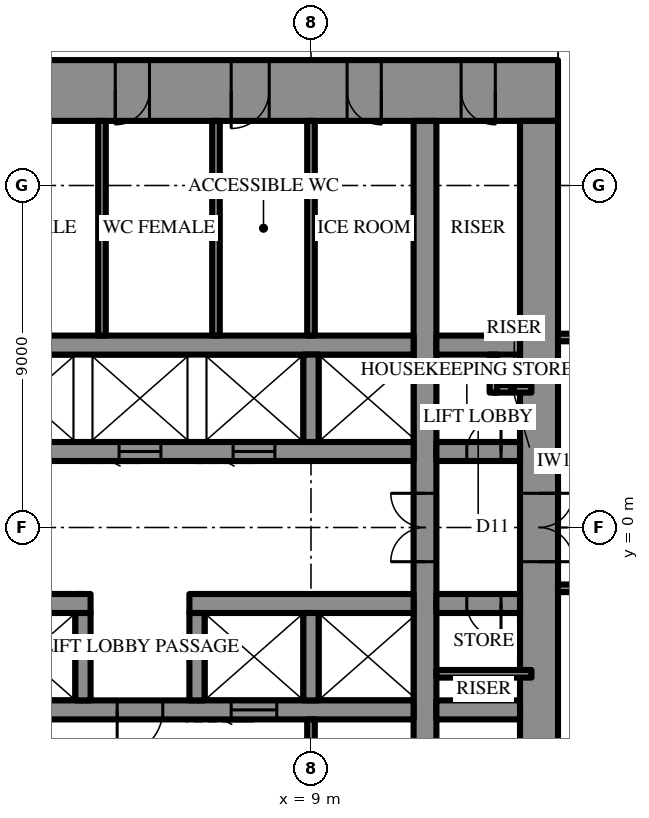
"""IFC4 building model, lengths in metres.
Left out: names, types, materials, properties, quantities, classifications, styles, units other than length and angle.
Written with IfcOpenShell. Run it as: python <this file> out.ifc"""

import sys

from ifc_helpers import new_model, si_unit, direction, frame, frame_2d, origin, place, context, subcontext, project, spatial, rectangle, extrude, element, fill, save


model = new_model("IFC4")
c1 = context("Model", 3, precision=1e-05, world=origin(), true_north=direction((0.0, 1.0)))
c2 = subcontext(c1, "Body", "Model", "MODEL_VIEW")
j1 = project(units=[si_unit("LENGTHUNIT", "METRE"), si_unit("PLANEANGLEUNIT", "RADIAN")], contexts=[c1])
p1 = place(None, origin())
s1 = spatial("IfcSite", under=j1, at=p1, CompositionType="ELEMENT")
p2 = place(p1, origin())
s2 = spatial("IfcBuilding", under=s1, at=p2, CompositionType="ELEMENT")
p3 = place(p2, frame((0.0, 0.0, 278.5)))
s3 = spatial("IfcBuildingStorey", under=s2, at=p3, CompositionType="ELEMENT", Elevation=278.5)
p4 = place(p3, frame((-15.5, 11.5, 0.0), z_axis=(0.0, 0.0, 1.0), x_axis=(1.0, 0.0, 0.0)))
e1 = element("IfcWall", 1, at=p4, inside=s3, PredefinedType="SHEAR", context=c2, shape_type="SweptSolid", body=[
    extrude(rectangle(XDim=31.0, YDim=1.6, at=frame_2d((15.5, 0.0))), origin(), (0.0, 0.0, 1.0), 4.2),
])
p5 = place(p4, frame((16.35, 0.0, 0.0)))
e2 = element("IfcOpeningElement", 2, at=p5, cuts=e1, PredefinedType="OPENING", context=c2, shape_type="SweptSolid", body=[
    extrude(rectangle(XDim=0.9, YDim=2.2, at=frame_2d((0.45, 1.1))), frame((0.0, 0.81, 0.0), z_axis=(0.0, -1.0, 0.0), x_axis=(1.0, 0.0, 0.0)), (0.0, 0.0, 1.0), 1.62),
])
p6 = place(p4, frame((19.35, 0.0, 0.0)))
e3 = element("IfcOpeningElement", 3, at=p6, cuts=e1, PredefinedType="OPENING", context=c2, shape_type="SweptSolid", body=[
    extrude(rectangle(XDim=0.9, YDim=2.2, at=frame_2d((0.45, 1.1))), frame((0.0, 0.81, 0.0), z_axis=(0.0, -1.0, 0.0), x_axis=(1.0, 0.0, 0.0)), (0.0, 0.0, 1.0), 1.62),
])
p7 = place(p4, frame((22.4, 0.0, 0.0)))
e4 = element("IfcOpeningElement", 4, at=p7, cuts=e1, PredefinedType="OPENING", context=c2, shape_type="SweptSolid", body=[
    extrude(rectangle(XDim=1.0, YDim=2.2, at=frame_2d((0.5, 1.1))), frame((0.0, 0.81, 0.0), z_axis=(0.0, -1.0, 0.0), x_axis=(1.0, 0.0, 0.0)), (0.0, 0.0, 1.0), 1.62),
])
p8 = place(p4, frame((1.65, 0.0, 0.0)))
e5 = element("IfcOpeningElement", 5, at=p8, cuts=e1, PredefinedType="OPENING", context=c2, shape_type="SweptSolid", body=[
    extrude(rectangle(XDim=0.9, YDim=2.2, at=frame_2d((0.45, 1.1))), frame((0.0, 0.81, 0.0), z_axis=(0.0, -1.0, 0.0), x_axis=(1.0, 0.0, 0.0)), (0.0, 0.0, 1.0), 1.62),
])
p9 = place(p4, frame((4.65, 0.0, 0.0)))
e6 = element("IfcOpeningElement", 6, at=p9, cuts=e1, PredefinedType="OPENING", context=c2, shape_type="SweptSolid", body=[
    extrude(rectangle(XDim=0.9, YDim=2.2, at=frame_2d((0.45, 1.1))), frame((0.0, 0.81, 0.0), z_axis=(0.0, -1.0, 0.0), x_axis=(1.0, 0.0, 0.0)), (0.0, 0.0, 1.0), 1.62),
])
p10 = place(p4, frame((25.45, 0.0, 0.0)))
e7 = element("IfcOpeningElement", 7, at=p10, cuts=e1, PredefinedType="OPENING", context=c2, shape_type="SweptSolid", body=[
    extrude(rectangle(XDim=0.9, YDim=2.2, at=frame_2d((0.45, 1.1))), frame((0.0, 0.81, 0.0), z_axis=(0.0, -1.0, 0.0), x_axis=(1.0, 0.0, 0.0)), (0.0, 0.0, 1.0), 1.62),
])
p11 = place(p4, frame((28.45, 0.0, 0.0)))
e8 = element("IfcOpeningElement", 8, at=p11, cuts=e1, PredefinedType="OPENING", context=c2, shape_type="SweptSolid", body=[
    extrude(rectangle(XDim=0.9, YDim=2.2, at=frame_2d((0.45, 1.1))), frame((0.0, 0.81, 0.0), z_axis=(0.0, -1.0, 0.0), x_axis=(1.0, 0.0, 0.0)), (0.0, 0.0, 1.0), 1.62),
])
p12 = place(p3, frame((15.0, -10.7, 0.0), z_axis=(0.0, 0.0, 1.0), x_axis=(0.0, 1.0, 0.0)))
e9 = element("IfcWall", 9, at=p12, inside=s3, PredefinedType="SHEAR", context=c2, shape_type="SweptSolid", body=[
    extrude(rectangle(XDim=21.4, YDim=1.0, at=frame_2d((10.7, 0.0))), origin(), (0.0, 0.0, 1.0), 4.2),
])
p13 = place(p12, frame((9.8, 0.0, 0.0)))
e10 = element("IfcOpeningElement", 10, at=p13, cuts=e9, PredefinedType="OPENING", context=c2, shape_type="SweptSolid", body=[
    extrude(rectangle(XDim=1.8, YDim=2.4, at=frame_2d((0.9, 1.2))), frame((0.0, 0.51, 0.0), z_axis=(0.0, -1.0, 0.0), x_axis=(1.0, 0.0, 0.0)), (0.0, 0.0, 1.0), 1.02),
])
p14 = place(p3, frame((12.0, -10.7, 0.0), z_axis=(0.0, 0.0, 1.0), x_axis=(0.0, 1.0, 0.0)))
e11 = element("IfcWall", 11, at=p14, inside=s3, PredefinedType="SHEAR", context=c2, shape_type="SweptSolid", body=[
    extrude(rectangle(XDim=21.4, YDim=0.6, at=frame_2d((10.7, 0.0))), origin(), (0.0, 0.0, 1.0), 4.2),
])
p15 = place(p14, frame((9.8, 0.0, 0.0)))
e12 = element("IfcOpeningElement", 12, at=p15, cuts=e11, PredefinedType="OPENING", context=c2, shape_type="SweptSolid", body=[
    extrude(rectangle(XDim=1.8, YDim=2.4, at=frame_2d((0.9, 1.2))), frame((0.0, 0.31, 0.0), z_axis=(0.0, -1.0, 0.0), x_axis=(1.0, 0.0, 0.0)), (0.0, 0.0, 1.0), 0.62),
])
p16 = place(p3, frame((-3.2, 2.0, 0.0), z_axis=(0.0, 0.0, 1.0), x_axis=(1.0, 0.0, 0.0)))
e13 = element("IfcWall", 13, at=p16, inside=s3, PredefinedType="SHEAR", context=c2, shape_type="SweptSolid", body=[
    extrude(rectangle(XDim=14.9, YDim=0.5, at=frame_2d((7.45, 0.0))), origin(), (0.0, 0.0, 1.0), 4.2),
])
p17 = place(p16, frame((1.15, 0.0, 0.0)))
e14 = element("IfcOpeningElement", 14, at=p17, cuts=e13, PredefinedType="OPENING", context=c2, shape_type="SweptSolid", body=[
    extrude(rectangle(XDim=1.1, YDim=2.2, at=frame_2d((0.55, 1.1))), frame((0.0, 0.26, 0.0), z_axis=(0.0, -1.0, 0.0), x_axis=(1.0, 0.0, 0.0)), (0.0, 0.0, 1.0), 0.52),
])
p18 = place(p16, frame((4.15, 0.0, 0.0)))
e15 = element("IfcOpeningElement", 15, at=p18, cuts=e13, PredefinedType="OPENING", context=c2, shape_type="SweptSolid", body=[
    extrude(rectangle(XDim=1.1, YDim=2.2, at=frame_2d((0.55, 1.1))), frame((0.0, 0.26, 0.0), z_axis=(0.0, -1.0, 0.0), x_axis=(1.0, 0.0, 0.0)), (0.0, 0.0, 1.0), 0.52),
])
p19 = place(p16, frame((7.15, 0.0, 0.0)))
e16 = element("IfcOpeningElement", 16, at=p19, cuts=e13, PredefinedType="OPENING", context=c2, shape_type="SweptSolid", body=[
    extrude(rectangle(XDim=1.1, YDim=2.2, at=frame_2d((0.55, 1.1))), frame((0.0, 0.26, 0.0), z_axis=(0.0, -1.0, 0.0), x_axis=(1.0, 0.0, 0.0)), (0.0, 0.0, 1.0), 0.52),
])
p20 = place(p16, frame((10.15, 0.0, 0.0)))
e17 = element("IfcOpeningElement", 17, at=p20, cuts=e13, PredefinedType="OPENING", context=c2, shape_type="SweptSolid", body=[
    extrude(rectangle(XDim=1.1, YDim=2.2, at=frame_2d((0.55, 1.1))), frame((0.0, 0.26, 0.0), z_axis=(0.0, -1.0, 0.0), x_axis=(1.0, 0.0, 0.0)), (0.0, 0.0, 1.0), 0.52),
])
p21 = place(p3, frame((12.3, 2.0, 0.0), z_axis=(0.0, 0.0, 1.0), x_axis=(1.0, 0.0, 0.0)))
e18 = element("IfcWall", 18, at=p21, inside=s3, PredefinedType="SHEAR", context=c2, shape_type="SweptSolid", body=[
    extrude(rectangle(XDim=2.2, YDim=0.5, at=frame_2d((1.1, 0.0))), origin(), (0.0, 0.0, 1.0), 4.2),
])
p22 = place(p21, frame((0.8, 0.0, 0.0)))
e19 = element("IfcOpeningElement", 19, at=p22, cuts=e18, PredefinedType="OPENING", context=c2, shape_type="SweptSolid", body=[
    extrude(rectangle(XDim=0.9, YDim=2.2, at=frame_2d((0.45, 1.1))), frame((0.0, 0.26, 0.0), z_axis=(0.0, -1.0, 0.0), x_axis=(1.0, 0.0, 0.0)), (0.0, 0.0, 1.0), 0.52),
])
p23 = place(p3, frame((-11.7, 4.8, 0.0), z_axis=(0.0, 0.0, 1.0), x_axis=(1.0, 0.0, 0.0)))
e20 = element("IfcWall", 20, at=p23, inside=s3, PredefinedType="SHEAR", context=c2, shape_type="SweptSolid", body=[
    extrude(rectangle(XDim=23.4, YDim=0.5, at=frame_2d((11.7, 0.0))), origin(), (0.0, 0.0, 1.0), 4.2),
])
p24 = place(p23, frame((6.6, 0.0, 0.0)))
e21 = element("IfcOpeningElement", 21, at=p24, cuts=e20, PredefinedType="OPENING", context=c2, shape_type="SweptSolid", body=[
    extrude(rectangle(XDim=1.2, YDim=2.2, at=frame_2d((0.6, 1.1))), frame((0.0, 0.26, 0.0), z_axis=(0.0, -1.0, 0.0), x_axis=(1.0, 0.0, 0.0)), (0.0, 0.0, 1.0), 0.52),
])
p25 = place(p23, frame((3.6, 0.0, 0.0)))
e22 = element("IfcOpeningElement", 22, at=p25, cuts=e20, PredefinedType="OPENING", context=c2, shape_type="SweptSolid", body=[
    extrude(rectangle(XDim=1.2, YDim=2.2, at=frame_2d((0.6, 1.1))), frame((0.0, 0.26, 0.0), z_axis=(0.0, -1.0, 0.0), x_axis=(1.0, 0.0, 0.0)), (0.0, 0.0, 1.0), 0.52),
])
p26 = place(p3, frame((12.3, 4.8, 0.0), z_axis=(0.0, 0.0, 1.0), x_axis=(1.0, 0.0, 0.0)))
e23 = element("IfcWall", 23, at=p26, inside=s3, PredefinedType="SHEAR", context=c2, shape_type="SweptSolid", body=[
    extrude(rectangle(XDim=2.2, YDim=0.5, at=frame_2d((1.1, 0.0))), origin(), (0.0, 0.0, 1.0), 4.2),
])
p27 = place(p3, frame((9.0, 2.25, 0.0), z_axis=(0.0, 0.0, 1.0), x_axis=(0.0, 1.0, 0.0)))
e24 = element("IfcWall", 24, at=p27, inside=s3, PredefinedType="SHEAR", context=c2, shape_type="SweptSolid", body=[
    extrude(rectangle(XDim=2.3, YDim=0.4, at=frame_2d((1.15, 0.0))), origin(), (0.0, 0.0, 1.0), 4.2),
])
p28 = place(p3, frame((14.5, -2.0, 0.0), z_axis=(0.0, 0.0, 1.0), x_axis=(-1.0, 0.0, 0.0)))
e25 = element("IfcWall", 25, at=p28, inside=s3, PredefinedType="SHEAR", context=c2, shape_type="SweptSolid", body=[
    extrude(rectangle(XDim=2.2, YDim=0.5, at=frame_2d((1.1, 0.0))), origin(), (0.0, 0.0, 1.0), 4.2),
])
p29 = place(p28, frame((0.5, 0.0, 0.0)))
e26 = element("IfcOpeningElement", 26, at=p29, cuts=e25, PredefinedType="OPENING", context=c2, shape_type="SweptSolid", body=[
    extrude(rectangle(XDim=0.9, YDim=2.2, at=frame_2d((0.45, 1.1))), frame((0.0, 0.26, 0.0), z_axis=(0.0, -1.0, 0.0), x_axis=(1.0, 0.0, 0.0)), (0.0, 0.0, 1.0), 0.52),
])
p30 = place(p3, frame((11.7, -2.0, 0.0), z_axis=(0.0, 0.0, 1.0), x_axis=(-1.0, 0.0, 0.0)))
e27 = element("IfcWall", 27, at=p30, inside=s3, PredefinedType="SHEAR", context=c2, shape_type="SweptSolid", body=[
    extrude(rectangle(XDim=5.9, YDim=0.5, at=frame_2d((2.95, 0.0))), origin(), (0.0, 0.0, 1.0), 4.2),
])
p31 = place(p3, frame((3.2, -2.0, 0.0), z_axis=(0.0, 0.0, 1.0), x_axis=(-1.0, 0.0, 0.0)))
e28 = element("IfcWall", 28, at=p31, inside=s3, PredefinedType="SHEAR", context=c2, shape_type="SweptSolid", body=[
    extrude(rectangle(XDim=14.9, YDim=0.5, at=frame_2d((7.45, 0.0))), origin(), (0.0, 0.0, 1.0), 4.2),
])
p32 = place(p31, frame((1.15, 0.0, 0.0)))
e29 = element("IfcOpeningElement", 29, at=p32, cuts=e28, PredefinedType="OPENING", context=c2, shape_type="SweptSolid", body=[
    extrude(rectangle(XDim=1.1, YDim=2.2, at=frame_2d((0.55, 1.1))), frame((0.0, 0.26, 0.0), z_axis=(0.0, -1.0, 0.0), x_axis=(1.0, 0.0, 0.0)), (0.0, 0.0, 1.0), 0.52),
])
p33 = place(p31, frame((4.15, 0.0, 0.0)))
e30 = element("IfcOpeningElement", 30, at=p33, cuts=e28, PredefinedType="OPENING", context=c2, shape_type="SweptSolid", body=[
    extrude(rectangle(XDim=1.1, YDim=2.2, at=frame_2d((0.55, 1.1))), frame((0.0, 0.26, 0.0), z_axis=(0.0, -1.0, 0.0), x_axis=(1.0, 0.0, 0.0)), (0.0, 0.0, 1.0), 0.52),
])
p34 = place(p31, frame((7.15, 0.0, 0.0)))
e31 = element("IfcOpeningElement", 31, at=p34, cuts=e28, PredefinedType="OPENING", context=c2, shape_type="SweptSolid", body=[
    extrude(rectangle(XDim=1.1, YDim=2.2, at=frame_2d((0.55, 1.1))), frame((0.0, 0.26, 0.0), z_axis=(0.0, -1.0, 0.0), x_axis=(1.0, 0.0, 0.0)), (0.0, 0.0, 1.0), 0.52),
])
p35 = place(p31, frame((10.15, 0.0, 0.0)))
e32 = element("IfcOpeningElement", 32, at=p35, cuts=e28, PredefinedType="OPENING", context=c2, shape_type="SweptSolid", body=[
    extrude(rectangle(XDim=1.1, YDim=2.2, at=frame_2d((0.55, 1.1))), frame((0.0, 0.26, 0.0), z_axis=(0.0, -1.0, 0.0), x_axis=(1.0, 0.0, 0.0)), (0.0, 0.0, 1.0), 0.52),
])
p36 = place(p3, frame((14.5, -4.8, 0.0), z_axis=(0.0, 0.0, 1.0), x_axis=(-1.0, 0.0, 0.0)))
e33 = element("IfcWall", 33, at=p36, inside=s3, PredefinedType="SHEAR", context=c2, shape_type="SweptSolid", body=[
    extrude(rectangle(XDim=2.2, YDim=0.5, at=frame_2d((1.1, 0.0))), origin(), (0.0, 0.0, 1.0), 4.2),
])
p37 = place(p3, frame((11.7, -4.8, 0.0), z_axis=(0.0, 0.0, 1.0), x_axis=(-1.0, 0.0, 0.0)))
e34 = element("IfcWall", 34, at=p37, inside=s3, PredefinedType="SHEAR", context=c2, shape_type="SweptSolid", body=[
    extrude(rectangle(XDim=23.4, YDim=0.5, at=frame_2d((11.7, 0.0))), origin(), (0.0, 0.0, 1.0), 4.2),
])
p38 = place(p37, frame((6.6, 0.0, 0.0)))
e35 = element("IfcOpeningElement", 35, at=p38, cuts=e34, PredefinedType="OPENING", context=c2, shape_type="SweptSolid", body=[
    extrude(rectangle(XDim=1.2, YDim=2.2, at=frame_2d((0.6, 1.1))), frame((0.0, 0.26, 0.0), z_axis=(0.0, -1.0, 0.0), x_axis=(1.0, 0.0, 0.0)), (0.0, 0.0, 1.0), 0.52),
])
p39 = place(p37, frame((3.6, 0.0, 0.0)))
e36 = element("IfcOpeningElement", 36, at=p39, cuts=e34, PredefinedType="OPENING", context=c2, shape_type="SweptSolid", body=[
    extrude(rectangle(XDim=1.2, YDim=2.2, at=frame_2d((0.6, 1.1))), frame((0.0, 0.26, 0.0), z_axis=(0.0, -1.0, 0.0), x_axis=(1.0, 0.0, 0.0)), (0.0, 0.0, 1.0), 0.52),
])
for number, where, z_axis, x_axis in (
    (37, (9.0, -2.25, 0.0), (0.0, 0.0, 1.0), (0.0, -1.0, 0.0)),
    (38, (6.0, -2.25, 0.0), (0.0, 0.0, 1.0), (0.0, -1.0, 0.0)),
    (39, (3.0, -2.25, 0.0), (0.0, 0.0, 1.0), (0.0, -1.0, 0.0)),
):
    element("IfcWall", number, at=place(p3, frame(where, z_axis=z_axis, x_axis=x_axis)), inside=s3, PredefinedType="SHEAR", context=c2, shape_type="SweptSolid", body=[
        extrude(rectangle(XDim=2.3, YDim=0.4, at=frame_2d((1.15, 0.0))), origin(), (0.0, 0.0, 1.0), 4.2),
    ])
for number, where, z_axis, x_axis in (
    (40, (9.0, 5.05, 0.0), (0.0, 0.0, 1.0), (0.0, 1.0, 0.0)),
    (41, (3.5, 5.05, 0.0), (0.0, 0.0, 1.0), (0.0, 1.0, 0.0)),
    (42, (6.5, 5.05, 0.0), (0.0, 0.0, 1.0), (0.0, 1.0, 0.0)),
    (43, (9.0, -5.05, 0.0), (0.0, 0.0, 1.0), (0.0, -1.0, 0.0)),
):
    element("IfcWall", number, at=place(p3, frame(where, z_axis=z_axis, x_axis=x_axis)), inside=s3, PredefinedType="PARTITIONING", context=c2, shape_type="SweptSolid", body=[
        extrude(rectangle(XDim=5.65, YDim=0.2, at=frame_2d((2.825, 0.0))), origin(), (0.0, 0.0, 1.0), 4.0),
    ])
for number, where, z_axis, x_axis in (
    (44, (13.8, 3.65, 0.0), (0.0, 0.0, 1.0), (1.0, 0.0, 0.0)),
    (45, (13.8, 3.55, 0.0), (0.0, 0.0, 1.0), (0.0, 1.0, 0.0)),
):
    element("IfcWall", number, at=place(p3, frame(where, z_axis=z_axis, x_axis=x_axis)), inside=s3, PredefinedType="PARTITIONING", context=c2, shape_type="SweptSolid", body=[
        extrude(rectangle(XDim=1.0, YDim=0.2, at=frame_2d((0.5, 0.0))), origin(), (0.0, 0.0, 1.0), 4.0),
    ])
p40 = place(p3, frame((14.8, -3.85, 0.0), z_axis=(0.0, 0.0, 1.0), x_axis=(-1.0, 0.0, 0.0)))
e46 = element("IfcWall", 46, at=p40, inside=s3, PredefinedType="PARTITIONING", context=c2, shape_type="SweptSolid", body=[
    extrude(rectangle(XDim=2.5, YDim=0.2, at=frame_2d((1.25, 0.0))), origin(), (0.0, 0.0, 1.0), 4.0),
])
p41 = place(p3, frame((15.5, 1.6, 0.0), z_axis=(0.0, 0.0, 1.0), x_axis=(1.0, 0.0, 0.0)))
e47 = element("IfcWall", 47, at=p41, inside=s3, PredefinedType="PARTITIONING", context=c2, shape_type="SweptSolid", body=[
    extrude(rectangle(XDim=10.7, YDim=0.2, at=frame_2d((5.35, 0.0))), origin(), (0.0, 0.0, 1.0), 4.0),
])
p42 = place(p41, frame((2.71, 0.0, 0.0)))
e48 = element("IfcOpeningElement", 48, at=p42, cuts=e47, PredefinedType="OPENING", context=c2, shape_type="SweptSolid", body=[
    extrude(rectangle(XDim=1.0, YDim=2.2, at=frame_2d((0.5, 1.1))), frame((0.0, 0.11, 0.0), z_axis=(0.0, -1.0, 0.0), x_axis=(1.0, 0.0, 0.0)), (0.0, 0.0, 1.0), 0.22),
])
p43 = place(p3, frame((15.5, -1.6, 0.0), z_axis=(0.0, 0.0, 1.0), x_axis=(1.0, 0.0, 0.0)))
e49 = element("IfcWall", 49, at=p43, inside=s3, PredefinedType="PARTITIONING", context=c2, shape_type="SweptSolid", body=[
    extrude(rectangle(XDim=2.3, YDim=0.2, at=frame_2d((1.15, 0.0))), origin(), (0.0, 0.0, 1.0), 4.0),
])
p44 = place(p3, frame((15.5, 5.0, 0.0), z_axis=(0.0, 0.0, 1.0), x_axis=(1.0, 0.0, 0.0)))
e50 = element("IfcWall", 50, at=p44, inside=s3, PredefinedType="PARTITIONING", context=c2, shape_type="SweptSolid", body=[
    extrude(rectangle(XDim=14.845, YDim=0.2, at=frame_2d((7.423, 0.0))), origin(), (0.0, 0.0, 1.0), 4.0),
])
p45 = place(p44, frame((0.985, 0.0, 0.0)))
e51 = element("IfcOpeningElement", 51, at=p45, cuts=e50, PredefinedType="OPENING", context=c2, shape_type="SweptSolid", body=[
    extrude(rectangle(XDim=1.0, YDim=2.2, at=frame_2d((0.5, 1.1))), frame((0.0, 0.11, 0.0), z_axis=(0.0, -1.0, 0.0), x_axis=(1.0, 0.0, 0.0)), (0.0, 0.0, 1.0), 0.22),
])
p46 = place(p13, frame((1.8, 0.0, 0.0), z_axis=(0.0, 0.0, 1.0), x_axis=(-1.0, 0.0, 0.0)))
e52 = element("IfcDoor", 52, at=p46, inside=s3, OperationType="DOUBLE_DOOR_SINGLE_SWING", PredefinedType="DOOR", context=c2, shape_type="SweptSolid", body=[
    extrude(rectangle(XDim=1.8, YDim=2.4, at=frame_2d((0.9, 1.2))), frame((0.0, 0.025, 0.0), z_axis=(0.0, -1.0, 0.0), x_axis=(1.0, 0.0, 0.0)), (0.0, 0.0, 1.0), 0.05),
])
fill(e10, e52)
p47 = place(p6, frame((0.9, 0.0, 0.0), z_axis=(0.0, 0.0, 1.0), x_axis=(-1.0, 0.0, 0.0)))
e53 = element("IfcDoor", 53, at=p47, inside=s3, OperationType="SINGLE_SWING_LEFT", PredefinedType="DOOR", context=c2, shape_type="SweptSolid", body=[
    extrude(rectangle(XDim=0.9, YDim=2.2, at=frame_2d((0.45, 1.1))), frame((0.0, 0.025, 0.0), z_axis=(0.0, -1.0, 0.0), x_axis=(1.0, 0.0, 0.0)), (0.0, 0.0, 1.0), 0.05),
])
fill(e3, e53)
p48 = place(p7, frame((1.0, 0.0, 0.0), z_axis=(0.0, 0.0, 1.0), x_axis=(-1.0, 0.0, 0.0)))
e54 = element("IfcDoor", 54, at=p48, inside=s3, OperationType="SINGLE_SWING_LEFT", PredefinedType="DOOR", context=c2, shape_type="SweptSolid", body=[
    extrude(rectangle(XDim=1.0, YDim=2.2, at=frame_2d((0.5, 1.1))), frame((0.0, 0.025, 0.0), z_axis=(0.0, -1.0, 0.0), x_axis=(1.0, 0.0, 0.0)), (0.0, 0.0, 1.0), 0.05),
])
fill(e4, e54)
p49 = place(p10, frame((0.9, 0.0, 0.0), z_axis=(0.0, 0.0, 1.0), x_axis=(-1.0, 0.0, 0.0)))
e55 = element("IfcDoor", 55, at=p49, inside=s3, OperationType="SINGLE_SWING_RIGHT", PredefinedType="DOOR", context=c2, shape_type="SweptSolid", body=[
    extrude(rectangle(XDim=0.9, YDim=2.2, at=frame_2d((0.45, 1.1))), frame((0.0, 0.025, 0.0), z_axis=(0.0, -1.0, 0.0), x_axis=(1.0, 0.0, 0.0)), (0.0, 0.0, 1.0), 0.05),
])
fill(e7, e55)
p50 = place(p11, frame((0.9, 0.0, 0.0), z_axis=(0.0, 0.0, 1.0), x_axis=(-1.0, 0.0, 0.0)))
e56 = element("IfcDoor", 56, at=p50, inside=s3, OperationType="SINGLE_SWING_RIGHT", PredefinedType="DOOR", context=c2, shape_type="SweptSolid", body=[
    extrude(rectangle(XDim=0.9, YDim=2.2, at=frame_2d((0.45, 1.1))), frame((0.0, 0.025, 0.0), z_axis=(0.0, -1.0, 0.0), x_axis=(1.0, 0.0, 0.0)), (0.0, 0.0, 1.0), 0.05),
])
fill(e8, e56)
p51 = place(p38, origin())
e57 = element("IfcDoor", 57, at=p51, inside=s3, OperationType="SINGLE_SWING_LEFT", PredefinedType="DOOR", context=c2, shape_type="SweptSolid", body=[
    extrude(rectangle(XDim=1.2, YDim=2.2, at=frame_2d((0.6, 1.1))), frame((0.0, 0.025, 0.0), z_axis=(0.0, -1.0, 0.0), x_axis=(1.0, 0.0, 0.0)), (0.0, 0.0, 1.0), 0.05),
])
fill(e35, e57)
p52 = place(p22, origin())
e58 = element("IfcDoor", 58, at=p52, inside=s3, OperationType="SINGLE_SWING_LEFT", PredefinedType="DOOR", context=c2, shape_type="SweptSolid", body=[
    extrude(rectangle(XDim=0.9, YDim=2.2, at=frame_2d((0.45, 1.1))), frame((0.0, 0.025, 0.0), z_axis=(0.0, -1.0, 0.0), x_axis=(1.0, 0.0, 0.0)), (0.0, 0.0, 1.0), 0.05),
])
fill(e19, e58)
p53 = place(p29, origin())
e59 = element("IfcDoor", 59, at=p53, inside=s3, OperationType="SINGLE_SWING_RIGHT", PredefinedType="DOOR", context=c2, shape_type="SweptSolid", body=[
    extrude(rectangle(XDim=0.9, YDim=2.2, at=frame_2d((0.45, 1.1))), frame((0.0, 0.025, 0.0), z_axis=(0.0, -1.0, 0.0), x_axis=(1.0, 0.0, 0.0)), (0.0, 0.0, 1.0), 0.05),
])
fill(e26, e59)
p54 = place(p15, origin())
e60 = element("IfcDoor", 60, at=p54, inside=s3, OperationType="DOUBLE_DOOR_SINGLE_SWING", PredefinedType="DOOR", context=c2, shape_type="SweptSolid", body=[
    extrude(rectangle(XDim=1.8, YDim=2.4, at=frame_2d((0.9, 1.2))), frame((0.0, 0.025, 0.0), z_axis=(0.0, -1.0, 0.0), x_axis=(1.0, 0.0, 0.0)), (0.0, 0.0, 1.0), 0.05),
])
fill(e12, e60)
p55 = place(p19, frame((1.1, 0.0, 0.0), z_axis=(0.0, 0.0, 1.0), x_axis=(-1.0, 0.0, 0.0)))
e61 = element("IfcDoor", 61, at=p55, inside=s3, OperationType="SLIDING_TO_LEFT", PredefinedType="DOOR", context=c2, shape_type="SweptSolid", body=[
    extrude(rectangle(XDim=1.1, YDim=2.2, at=frame_2d((0.55, 1.1))), frame((0.0, 0.025, 0.0), z_axis=(0.0, -1.0, 0.0), x_axis=(1.0, 0.0, 0.0)), (0.0, 0.0, 1.0), 0.05),
])
fill(e16, e61)
p56 = place(p20, frame((1.1, 0.0, 0.0), z_axis=(0.0, 0.0, 1.0), x_axis=(-1.0, 0.0, 0.0)))
e62 = element("IfcDoor", 62, at=p56, inside=s3, OperationType="SLIDING_TO_LEFT", PredefinedType="DOOR", context=c2, shape_type="SweptSolid", body=[
    extrude(rectangle(XDim=1.1, YDim=2.2, at=frame_2d((0.55, 1.1))), frame((0.0, 0.025, 0.0), z_axis=(0.0, -1.0, 0.0), x_axis=(1.0, 0.0, 0.0)), (0.0, 0.0, 1.0), 0.05),
])
fill(e17, e62)
p57 = place(p39, origin())
e63 = element("IfcDoor", 63, at=p57, inside=s3, OperationType="SLIDING_TO_LEFT", PredefinedType="DOOR", context=c2, shape_type="SweptSolid", body=[
    extrude(rectangle(XDim=1.2, YDim=2.2, at=frame_2d((0.6, 1.1))), frame((0.0, 0.025, 0.0), z_axis=(0.0, -1.0, 0.0), x_axis=(1.0, 0.0, 0.0)), (0.0, 0.0, 1.0), 0.05),
])
fill(e36, e63)
save(model, sys.argv[1])
